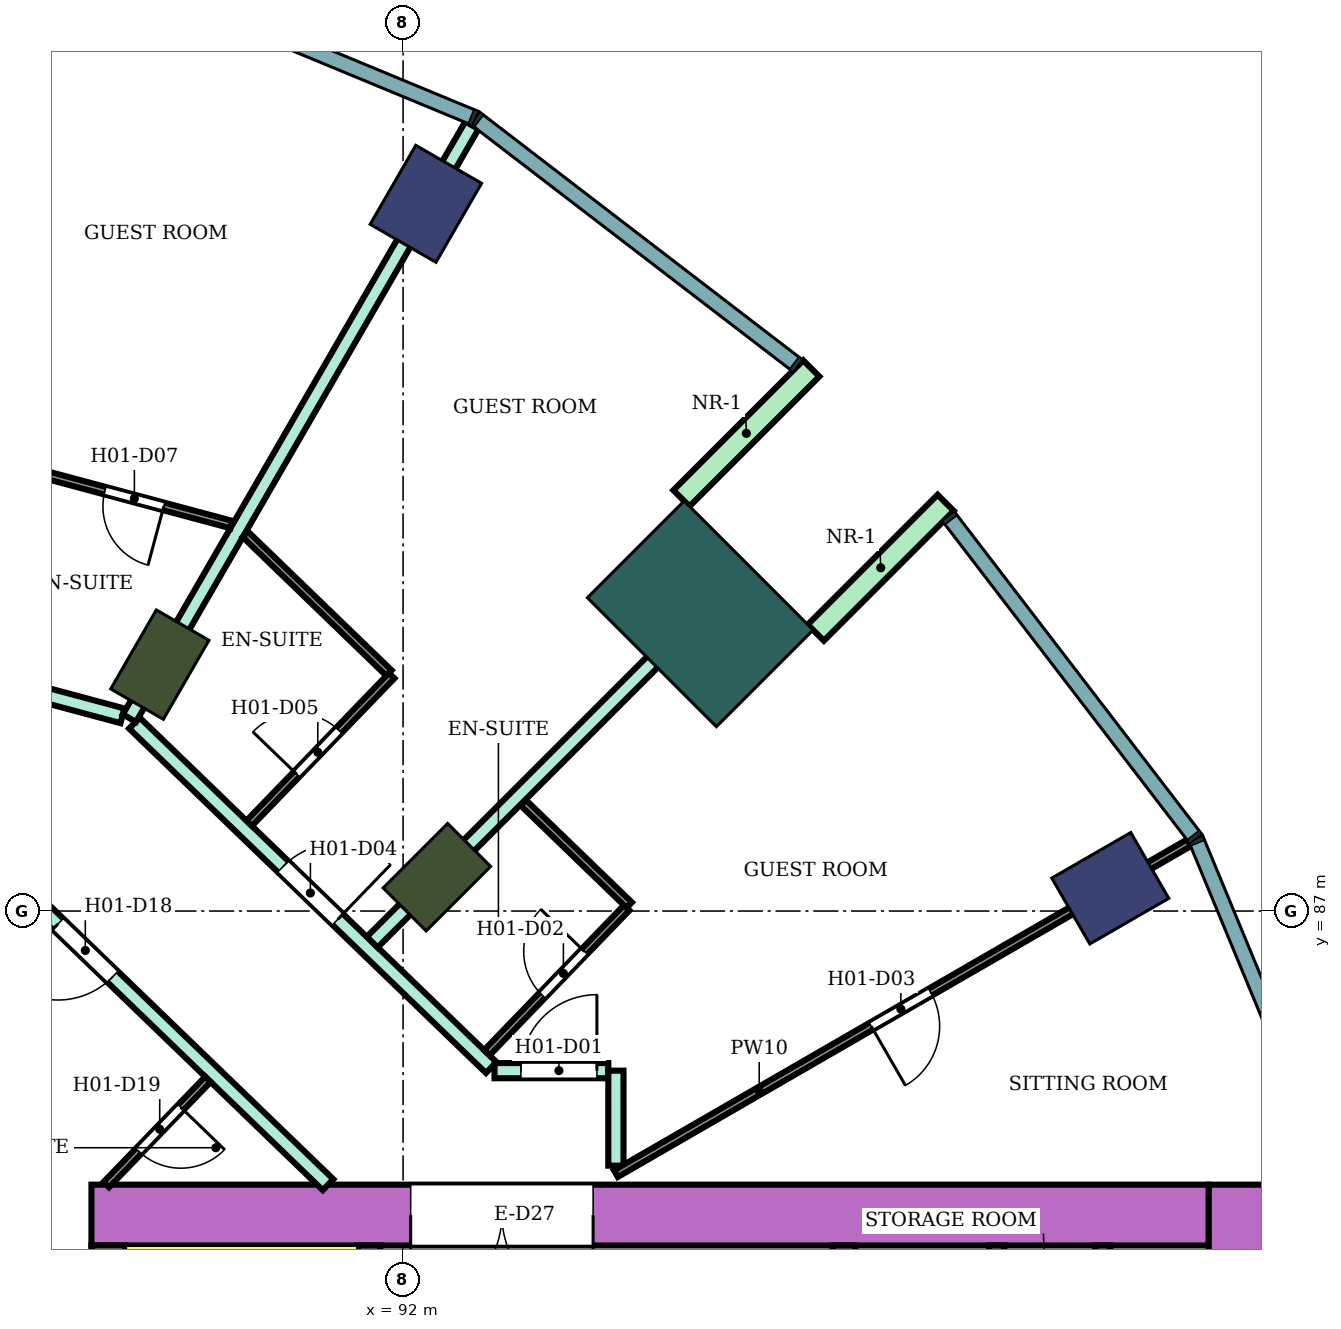
"""IFC4 building model, lengths in metres.
Left out: names, types, materials, properties, quantities, classifications, styles, units other than length and angle.
Written with IfcOpenShell. Run it as: python <this file> out.ifc"""

import sys

from ifc_helpers import new_model, si_unit, direction, frame, frame_2d, origin, origin_2d, place, context, subcontext, project, spatial, rectangle, extrude, element, fill, save


model = new_model("IFC4")
c1 = context("Model", 3, precision=1e-05, world=origin(), true_north=direction((0.0, 1.0)))
c2 = subcontext(c1, "Body", "Model", "MODEL_VIEW")
j1 = project(units=[si_unit("LENGTHUNIT", "METRE"), si_unit("PLANEANGLEUNIT", "RADIAN")], contexts=[c1])
p1 = place(None, origin())
s1 = spatial("IfcSite", under=j1, at=p1, CompositionType="ELEMENT")
p2 = place(p1, origin())
s2 = spatial("IfcBuilding", under=s1, at=p2, CompositionType="ELEMENT")
p3 = place(p2, frame((0.0, 0.0, 32.6)))
s3 = spatial("IfcBuildingStorey", under=s2, at=p3, CompositionType="ELEMENT", Elevation=32.6)
for number, where, z_axis, x_axis in (
    (1, (101.304, 87.3, 0.0), (0.0, 0.0, 1.0), (0.866, 0.5, 0.0)),
    (2, (92.3, 96.304, 0.0), (0.0, 0.0, 1.0), (0.5, 0.866, 0.0)),
):
    element("IfcColumn", number, at=place(p3, frame(where, z_axis=z_axis, x_axis=x_axis)), inside=s3, PredefinedType="COLUMN", context=c2, shape_type="SweptSolid", body=[
        extrude(rectangle(XDim=1.2, YDim=1.0, at=origin_2d()), origin(), (0.0, 0.0, 1.0), 3.8),
    ])
for number, where, z_axis, x_axis in (
    (3, (92.445, 87.445, 0.0), (0.0, 0.0, 1.0), (0.707, 0.707, 0.0)),
    (4, (88.8, 90.242, 0.0), (0.0, 0.0, 1.0), (0.5, 0.866, 0.0)),
):
    element("IfcColumn", number, at=place(p3, frame(where, z_axis=z_axis, x_axis=x_axis)), inside=s3, PredefinedType="COLUMN", context=c2, shape_type="SweptSolid", body=[
        extrude(rectangle(XDim=1.2, YDim=0.8, at=origin_2d()), origin(), (0.0, 0.0, 1.0), 3.8),
    ])
p4 = place(p3, frame((95.91, 90.91, 0.0), z_axis=(0.0, 0.0, 1.0), x_axis=(0.707106781187, 0.707106781187, 0.0)))
e5 = element("IfcColumn", 5, at=p4, inside=s3, PredefinedType="COLUMN", context=c2, shape_type="SweptSolid", body=[
    extrude(rectangle(XDim=1.8, YDim=2.4, at=origin_2d()), origin(), (0.0, 0.0, 1.0), 3.8),
])
p5 = place(p3, frame((87.9, 83.0, 0.0), z_axis=(0.0, 0.0, 1.0), x_axis=(1.0, 0.0, 0.0)))
e6 = element("IfcWall", 6, at=p5, inside=s3, PredefinedType="SHEAR", context=c2, shape_type="SweptSolid", body=[
    extrude(rectangle(XDim=14.7, YDim=0.8, at=frame_2d((7.35, 0.0))), origin(), (0.0, 0.0, 1.0), 3.48),
])
p6 = place(p5, frame((4.2, 0.0, 0.0)))
e7 = element("IfcOpeningElement", 7, at=p6, cuts=e6, PredefinedType="OPENING", context=c2, shape_type="SweptSolid", body=[
    extrude(rectangle(XDim=2.4, YDim=2.4, at=frame_2d((1.2, 1.2))), frame((0.0, 0.41, 0.0), z_axis=(0.0, -1.0, 0.0), x_axis=(1.0, 0.0, 0.0)), (0.0, 0.0, 1.0), 0.82),
])
p7 = place(p3, frame((88.125, 75.0, 0.0), z_axis=(0.0, 0.0, 1.0), x_axis=(0.0, 1.0, 0.0)))
e8 = element("IfcWall", 8, at=p7, inside=s3, PredefinedType="SHEAR", context=c2, shape_type="SweptSolid", body=[
    extrude(rectangle(XDim=7.6, YDim=0.45, at=frame_2d((3.8, 0.0))), origin(), (0.0, 0.0, 1.0), 3.48),
])
p8 = place(p3, frame((103.0, 66.6, 0.0), z_axis=(0.0, 0.0, 1.0), x_axis=(0.0, 1.0, 0.0)))
e9 = element("IfcWall", 9, at=p8, inside=s3, PredefinedType="SHEAR", context=c2, shape_type="SweptSolid", body=[
    extrude(rectangle(XDim=16.8, YDim=0.8, at=frame_2d((8.4, 0.0))), origin(), (0.0, 0.0, 1.0), 3.48),
])
p9 = place(p3, frame((91.55, 75.0, 0.0), z_axis=(0.0, 0.0, 1.0), x_axis=(0.0, 1.0, 0.0)))
e10 = element("IfcWall", 10, at=p9, inside=s3, PredefinedType="SHEAR", context=c2, shape_type="SweptSolid", body=[
    extrude(rectangle(XDim=7.6, YDim=0.3, at=frame_2d((3.8, 0.0))), origin(), (0.0, 0.0, 1.0), 3.48),
])
p10 = place(p9, frame((1.85, 0.0, 0.0)))
e11 = element("IfcOpeningElement", 11, at=p10, cuts=e10, PredefinedType="OPENING", context=c2, shape_type="SweptSolid", body=[
    extrude(rectangle(XDim=0.9, YDim=2.1, at=frame_2d((0.45, 1.05))), frame((0.0, 0.16, 0.0), z_axis=(0.0, -1.0, 0.0), x_axis=(1.0, 0.0, 0.0)), (0.0, 0.0, 1.0), 0.32),
])
p11 = place(p3, frame((97.8, 78.6, 0.0), z_axis=(0.0, 0.0, 1.0), x_axis=(0.0, 1.0, 0.0)))
e12 = element("IfcWall", 12, at=p11, inside=s3, PredefinedType="SHEAR", context=c2, shape_type="SweptSolid", body=[
    extrude(rectangle(XDim=4.0, YDim=0.3, at=frame_2d((2.0, 0.0))), origin(), (0.0, 0.0, 1.0), 3.48),
])
for number, where, z_axis, x_axis in (
    (13, (97.43, 90.662, 0.0), (0.0, 0.0, 1.0), (0.707, 0.707, 0.0)),
    (14, (95.662, 92.43, 0.0), (0.0, 0.0, 1.0), (0.707, 0.707, 0.0)),
):
    element("IfcWall", number, at=place(p3, frame(where, z_axis=z_axis, x_axis=x_axis)), inside=s3, PredefinedType="NOTDEFINED", context=c2, shape_type="SweptSolid", body=[
        extrude(rectangle(XDim=2.416, YDim=0.3, at=frame_2d((1.208, 0.0))), origin(), (0.0, 0.0, 1.0), 3.8),
    ])
p12 = place(p3, frame((80.0, 91.797, 0.0), z_axis=(0.0, 0.0, 1.0), x_axis=(0.965857042792, -0.259075612301, 0.0)))
e15 = element("IfcWall", 15, at=p12, inside=s3, PredefinedType="PARTITIONING", context=c2, shape_type="SweptSolid", body=[
    extrude(rectangle(XDim=8.602, YDim=0.2, at=frame_2d((4.301, 0.0))), origin(), (0.0, 0.0, 1.0), 3.35),
])
p13 = place(p12, frame((4.877, 0.0, 0.0)))
e16 = element("IfcOpeningElement", 16, at=p13, cuts=e15, PredefinedType="OPENING", context=c2, shape_type="SweptSolid", body=[
    extrude(rectangle(XDim=1.0, YDim=2.1, at=frame_2d((0.5, 1.05))), frame((0.0, 0.11, 0.0), z_axis=(0.0, -1.0, 0.0), x_axis=(1.0, 0.0, 0.0)), (0.0, 0.0, 1.0), 0.22),
])
p14 = place(p12, frame((2.73, 0.0, 0.0)))
e17 = element("IfcOpeningElement", 17, at=p14, cuts=e15, PredefinedType="OPENING", context=c2, shape_type="SweptSolid", body=[
    extrude(rectangle(XDim=1.1, YDim=2.1, at=frame_2d((0.55, 1.05))), frame((0.0, 0.11, 0.0), z_axis=(0.0, -1.0, 0.0), x_axis=(1.0, 0.0, 0.0)), (0.0, 0.0, 1.0), 0.22),
])
p15 = place(p3, frame((87.064, 87.211, 0.0), z_axis=(0.0, 0.0, 1.0), x_axis=(0.719540958932, -0.694450004262, 0.0)))
e18 = element("IfcWall", 18, at=p15, inside=s3, PredefinedType="PARTITIONING", context=c2, shape_type="SweptSolid", body=[
    extrude(rectangle(XDim=5.488, YDim=0.2, at=frame_2d((2.744, 0.0))), origin(), (0.0, 0.0, 1.0), 3.35),
])
p16 = place(p15, frame((0.55, 0.0, 0.0)))
e19 = element("IfcOpeningElement", 19, at=p16, cuts=e18, PredefinedType="OPENING", context=c2, shape_type="SweptSolid", body=[
    extrude(rectangle(XDim=1.0, YDim=2.1, at=frame_2d((0.5, 1.05))), frame((0.0, 0.11, 0.0), z_axis=(0.0, -1.0, 0.0), x_axis=(1.0, 0.0, 0.0)), (0.0, 0.0, 1.0), 0.22),
])
p17 = place(p3, frame((88.465, 89.473, 0.0), z_axis=(0.0, 0.0, 1.0), x_axis=(0.719457552421, -0.694536413922, 0.0)))
e20 = element("IfcWall", 20, at=p17, inside=s3, PredefinedType="PARTITIONING", context=c2, shape_type="SweptSolid", body=[
    extrude(rectangle(XDim=6.524, YDim=0.2, at=frame_2d((3.262, 0.0))), origin(), (0.0, 0.0, 1.0), 3.35),
])
p18 = place(p17, frame((2.719, 0.0, 0.0)))
e21 = element("IfcOpeningElement", 21, at=p18, cuts=e20, PredefinedType="OPENING", context=c2, shape_type="SweptSolid", body=[
    extrude(rectangle(XDim=1.0, YDim=2.1, at=frame_2d((0.5, 1.05))), frame((0.0, 0.11, 0.0), z_axis=(0.0, -1.0, 0.0), x_axis=(1.0, 0.0, 0.0)), (0.0, 0.0, 1.0), 0.22),
])
p19 = place(p3, frame((88.4, 89.538, 0.0), z_axis=(0.0, 0.0, 1.0), x_axis=(0.5002401188, 0.865886726739, 0.0)))
e22 = element("IfcWall", 22, at=p19, inside=s3, PredefinedType="PARTITIONING", context=c2, shape_type="SweptSolid", body=[
    extrude(rectangle(XDim=9.008, YDim=0.2, at=frame_2d((4.504, 0.0))), origin(), (0.0, 0.0, 1.0), 3.35),
])
p20 = place(p3, frame((91.594, 86.591, 0.0), z_axis=(0.0, 0.0, 1.0), x_axis=(0.707214399597, 0.706999146394, 0.0)))
e23 = element("IfcWall", 23, at=p20, inside=s3, PredefinedType="PARTITIONING", context=c2, shape_type="SweptSolid", body=[
    extrude(rectangle(XDim=6.805, YDim=0.2, at=frame_2d((3.403, 0.0))), origin(), (0.0, 0.0, 1.0), 3.35),
])
p21 = place(p3, frame((93.203, 84.9, 0.0), z_axis=(0.0, 0.0, 1.0), x_axis=(1.0, 0.0, 0.0)))
e24 = element("IfcWall", 24, at=p21, inside=s3, PredefinedType="PARTITIONING", context=c2, shape_type="SweptSolid", body=[
    extrude(rectangle(XDim=1.497, YDim=0.2, at=frame_2d((0.749, 0.0))), origin(), (0.0, 0.0, 1.0), 3.35),
])
p22 = place(p21, frame((0.347, 0.0, 0.0)))
e25 = element("IfcOpeningElement", 25, at=p22, cuts=e24, PredefinedType="OPENING", context=c2, shape_type="SweptSolid", body=[
    extrude(rectangle(XDim=1.0, YDim=2.1, at=frame_2d((0.5, 1.05))), frame((0.0, 0.11, 0.0), z_axis=(0.0, -1.0, 0.0), x_axis=(1.0, 0.0, 0.0)), (0.0, 0.0, 1.0), 0.22),
])
p23 = place(p3, frame((94.8, 83.65, 0.0), z_axis=(0.0, 0.0, 1.0), x_axis=(0.0, 1.0, 0.0)))
e26 = element("IfcWall", 26, at=p23, inside=s3, PredefinedType="PARTITIONING", context=c2, shape_type="SweptSolid", body=[
    extrude(rectangle(XDim=1.25, YDim=0.2, at=frame_2d((0.625, 0.0))), origin(), (0.0, 0.0, 1.0), 3.35),
])
p24 = place(p3, frame((87.082, 92.797, 0.0), z_axis=(0.0, 0.0, 1.0), x_axis=(0.965926679745, -0.258815859939, 0.0)))
e27 = element("IfcWall", 27, at=p24, inside=s3, PredefinedType="PARTITIONING", context=c2, shape_type="SweptSolid", body=[
    extrude(rectangle(XDim=2.753, YDim=0.1, at=frame_2d((1.377, 0.0))), origin(), (0.0, 0.0, 1.0), 3.35),
])
p25 = place(p24, frame((1.032, 0.0, 0.0)))
e28 = element("IfcOpeningElement", 28, at=p25, cuts=e27, PredefinedType="OPENING", context=c2, shape_type="SweptSolid", body=[
    extrude(rectangle(XDim=0.8, YDim=2.1, at=frame_2d((0.4, 1.05))), frame((0.0, 0.06, 0.0), z_axis=(0.0, -1.0, 0.0), x_axis=(1.0, 0.0, 0.0)), (0.0, 0.0, 1.0), 0.12),
])
p26 = place(p3, frame((88.095, 83.4, 0.0), z_axis=(0.0, 0.0, 1.0), x_axis=(0.694447472534, 0.719543402368, 0.0)))
e29 = element("IfcWall", 29, at=p26, inside=s3, PredefinedType="PARTITIONING", context=c2, shape_type="SweptSolid", body=[
    extrude(rectangle(XDim=1.926, YDim=0.1, at=frame_2d((0.963, 0.0))), origin(), (0.0, 0.0, 1.0), 3.35),
])
p27 = place(p26, frame((0.613, 0.0, 0.0)))
e30 = element("IfcOpeningElement", 30, at=p27, cuts=e29, PredefinedType="OPENING", context=c2, shape_type="SweptSolid", body=[
    extrude(rectangle(XDim=0.8, YDim=2.1, at=frame_2d((0.4, 1.05))), frame((0.0, 0.06, 0.0), z_axis=(0.0, -1.0, 0.0), x_axis=(1.0, 0.0, 0.0)), (0.0, 0.0, 1.0), 0.12),
])
p28 = place(p3, frame((89.925, 91.956, 0.0), z_axis=(0.0, 0.0, 1.0), x_axis=(0.71935982196, -0.694637636865, 0.0)))
e31 = element("IfcWall", 31, at=p28, inside=s3, PredefinedType="PARTITIONING", context=c2, shape_type="SweptSolid", body=[
    extrude(rectangle(XDim=2.627, YDim=0.1, at=frame_2d((1.313, 0.0))), origin(), (0.0, 0.0, 1.0), 3.35),
])
p29 = place(p3, frame((89.976, 88.154, 0.0), z_axis=(0.0, 0.0, 1.0), x_axis=(0.6945137956, 0.719479386585, 0.0)))
e32 = element("IfcWall", 32, at=p29, inside=s3, PredefinedType="PARTITIONING", context=c2, shape_type="SweptSolid", body=[
    extrude(rectangle(XDim=2.699, YDim=0.1, at=frame_2d((1.35, 0.0))), origin(), (0.0, 0.0, 1.0), 3.35),
])
p30 = place(p29, frame((0.9, 0.0, 0.0)))
e33 = element("IfcOpeningElement", 33, at=p30, cuts=e32, PredefinedType="OPENING", context=c2, shape_type="SweptSolid", body=[
    extrude(rectangle(XDim=0.8, YDim=2.1, at=frame_2d((0.4, 1.05))), frame((0.0, 0.06, 0.0), z_axis=(0.0, -1.0, 0.0), x_axis=(1.0, 0.0, 0.0)), (0.0, 0.0, 1.0), 0.12),
])
p31 = place(p3, frame((93.103, 85.136, 0.0), z_axis=(0.0, 0.0, 1.0), x_axis=(0.694324808789, 0.719661767708, 0.0)))
e34 = element("IfcWall", 34, at=p31, inside=s3, PredefinedType="PARTITIONING", context=c2, shape_type="SweptSolid", body=[
    extrude(rectangle(XDim=2.65, YDim=0.1, at=frame_2d((1.325, 0.0))), origin(), (0.0, 0.0, 1.0), 3.35),
])
p32 = place(p31, frame((1.05, 0.0, 0.0)))
e35 = element("IfcOpeningElement", 35, at=p32, cuts=e34, PredefinedType="OPENING", context=c2, shape_type="SweptSolid", body=[
    extrude(rectangle(XDim=0.8, YDim=2.1, at=frame_2d((0.4, 1.05))), frame((0.0, 0.06, 0.0), z_axis=(0.0, -1.0, 0.0), x_axis=(1.0, 0.0, 0.0)), (0.0, 0.0, 1.0), 0.12),
])
p33 = place(p3, frame((93.581, 88.425, 0.0), z_axis=(0.0, 0.0, 1.0), x_axis=(0.719336381931, -0.694661910307, 0.0)))
e36 = element("IfcWall", 36, at=p33, inside=s3, PredefinedType="PARTITIONING", context=c2, shape_type="SweptSolid", body=[
    extrude(rectangle(XDim=1.939, YDim=0.1, at=frame_2d((0.97, 0.0))), origin(), (0.0, 0.0, 1.0), 3.35),
])
p34 = place(p3, frame((94.8, 83.545, 0.0), z_axis=(0.0, 0.0, 1.0), x_axis=(0.86602264145, 0.500004784474, 0.0)))
e37 = element("IfcWall", 37, at=p34, inside=s3, PredefinedType="PARTITIONING", context=c2, shape_type="SweptSolid", body=[
    extrude(rectangle(XDim=8.708, YDim=0.1, at=frame_2d((4.354, 0.0))), origin(), (0.0, 0.0, 1.0), 3.35),
])
p35 = place(p34, frame((3.879, 0.0, 0.0)))
e38 = element("IfcOpeningElement", 38, at=p35, cuts=e37, PredefinedType="OPENING", context=c2, shape_type="SweptSolid", body=[
    extrude(rectangle(XDim=0.9, YDim=2.1, at=frame_2d((0.45, 1.05))), frame((0.0, 0.06, 0.0), z_axis=(0.0, -1.0, 0.0), x_axis=(1.0, 0.0, 0.0)), (0.0, 0.0, 1.0), 0.12),
])
for number, where, z_axis, x_axis in (
    (39, (99.81, 78.9, 0.0), (0.0, 0.0, 1.0), (0.0, 1.0, 0.0)),
    (40, (101.205, 78.9, 0.0), (0.0, 0.0, 1.0), (0.0, 1.0, 0.0)),
):
    element("IfcWall", number, at=place(p3, frame(where, z_axis=z_axis, x_axis=x_axis)), inside=s3, PredefinedType="PARTITIONING", context=c2, shape_type="SweptSolid", body=[
        extrude(rectangle(XDim=3.7, YDim=0.2, at=frame_2d((1.85, 0.0))), origin(), (0.0, 0.0, 1.0), 3.48),
    ])
p36 = place(p22, origin())
e41 = element("IfcDoor", 41, at=p36, inside=s3, OperationType="SINGLE_SWING_RIGHT", PredefinedType="DOOR", context=c2, shape_type="SweptSolid", body=[
    extrude(rectangle(XDim=1.0, YDim=2.1, at=frame_2d((0.5, 1.05))), frame((0.0, 0.025, 0.0), z_axis=(0.0, -1.0, 0.0), x_axis=(1.0, 0.0, 0.0)), (0.0, 0.0, 1.0), 0.05),
])
fill(e25, e41)
p37 = place(p32, origin())
e42 = element("IfcDoor", 42, at=p37, inside=s3, OperationType="SINGLE_SWING_RIGHT", PredefinedType="DOOR", context=c2, shape_type="SweptSolid", body=[
    extrude(rectangle(XDim=0.8, YDim=2.1, at=frame_2d((0.4, 1.05))), frame((0.0, 0.025, 0.0), z_axis=(0.0, -1.0, 0.0), x_axis=(1.0, 0.0, 0.0)), (0.0, 0.0, 1.0), 0.05),
])
fill(e35, e42)
p38 = place(p35, frame((0.9, 0.0, 0.0), z_axis=(0.0, 0.0, 1.0), x_axis=(-1.0, 0.0, 0.0)))
e43 = element("IfcDoor", 43, at=p38, inside=s3, OperationType="SINGLE_SWING_RIGHT", PredefinedType="DOOR", context=c2, shape_type="SweptSolid", body=[
    extrude(rectangle(XDim=0.9, YDim=2.1, at=frame_2d((0.45, 1.05))), frame((0.0, 0.025, 0.0), z_axis=(0.0, -1.0, 0.0), x_axis=(1.0, 0.0, 0.0)), (0.0, 0.0, 1.0), 0.05),
])
fill(e38, e43)
p39 = place(p18, origin())
e44 = element("IfcDoor", 44, at=p39, inside=s3, OperationType="SINGLE_SWING_RIGHT", PredefinedType="DOOR", context=c2, shape_type="SweptSolid", body=[
    extrude(rectangle(XDim=1.0, YDim=2.1, at=frame_2d((0.5, 1.05))), frame((0.0, 0.025, 0.0), z_axis=(0.0, -1.0, 0.0), x_axis=(1.0, 0.0, 0.0)), (0.0, 0.0, 1.0), 0.05),
])
fill(e21, e44)
p40 = place(p30, origin())
e45 = element("IfcDoor", 45, at=p40, inside=s3, OperationType="SINGLE_SWING_LEFT", PredefinedType="DOOR", context=c2, shape_type="SweptSolid", body=[
    extrude(rectangle(XDim=0.8, YDim=2.1, at=frame_2d((0.4, 1.05))), frame((0.0, 0.025, 0.0), z_axis=(0.0, -1.0, 0.0), x_axis=(1.0, 0.0, 0.0)), (0.0, 0.0, 1.0), 0.05),
])
fill(e33, e45)
p41 = place(p25, frame((0.8, 0.0, 0.0), z_axis=(0.0, 0.0, 1.0), x_axis=(-1.0, 0.0, 0.0)))
e46 = element("IfcDoor", 46, at=p41, inside=s3, OperationType="SINGLE_SWING_LEFT", PredefinedType="DOOR", context=c2, shape_type="SweptSolid", body=[
    extrude(rectangle(XDim=0.8, YDim=2.1, at=frame_2d((0.4, 1.05))), frame((0.0, 0.025, 0.0), z_axis=(0.0, -1.0, 0.0), x_axis=(1.0, 0.0, 0.0)), (0.0, 0.0, 1.0), 0.05),
])
fill(e28, e46)
p42 = place(p16, frame((1.0, 0.0, 0.0), z_axis=(0.0, 0.0, 1.0), x_axis=(-1.0, 0.0, 0.0)))
e47 = element("IfcDoor", 47, at=p42, inside=s3, OperationType="SINGLE_SWING_RIGHT", PredefinedType="DOOR", context=c2, shape_type="SweptSolid", body=[
    extrude(rectangle(XDim=1.0, YDim=2.1, at=frame_2d((0.5, 1.05))), frame((0.0, 0.025, 0.0), z_axis=(0.0, -1.0, 0.0), x_axis=(1.0, 0.0, 0.0)), (0.0, 0.0, 1.0), 0.05),
])
fill(e19, e47)
p43 = place(p27, frame((0.8, 0.0, 0.0), z_axis=(0.0, 0.0, 1.0), x_axis=(-1.0, 0.0, 0.0)))
e48 = element("IfcDoor", 48, at=p43, inside=s3, OperationType="SINGLE_SWING_LEFT", PredefinedType="DOOR", context=c2, shape_type="SweptSolid", body=[
    extrude(rectangle(XDim=0.8, YDim=2.1, at=frame_2d((0.4, 1.05))), frame((0.0, 0.025, 0.0), z_axis=(0.0, -1.0, 0.0), x_axis=(1.0, 0.0, 0.0)), (0.0, 0.0, 1.0), 0.05),
])
fill(e30, e48)
p44 = place(p6, frame((2.4, 0.0, 0.0), z_axis=(0.0, 0.0, 1.0), x_axis=(-1.0, 0.0, 0.0)))
e49 = element("IfcDoor", 49, at=p44, inside=s3, OperationType="DOUBLE_DOOR_SINGLE_SWING", PredefinedType="DOOR", context=c2, shape_type="SweptSolid", body=[
    extrude(rectangle(XDim=2.4, YDim=2.4, at=frame_2d((1.2, 1.2))), frame((0.0, 0.025, 0.0), z_axis=(0.0, -1.0, 0.0), x_axis=(1.0, 0.0, 0.0)), (0.0, 0.0, 1.0), 0.05),
])
fill(e7, e49)
save(model, sys.argv[1])
